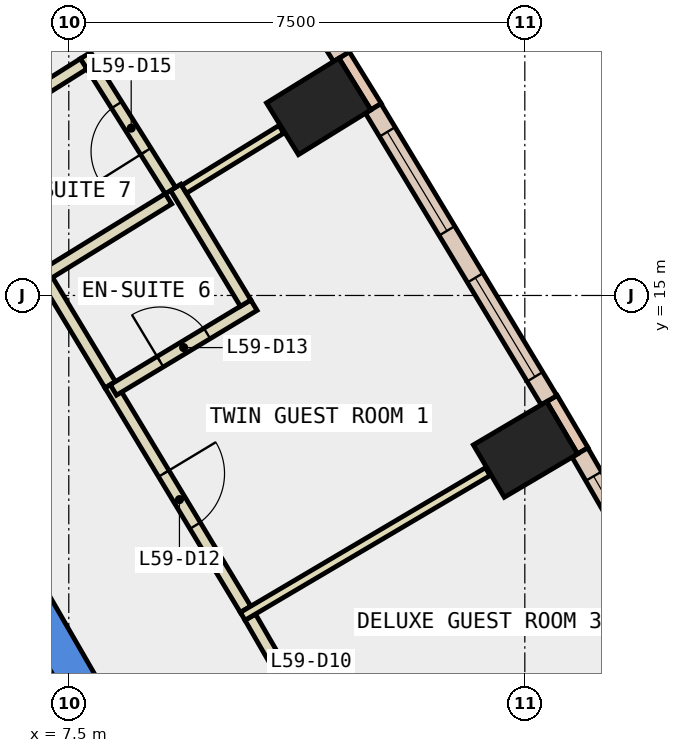
"""IFC4 building model, lengths in metres.
Left out: names, types, materials, properties, quantities, classifications, styles, units other than length and angle.
Written with IfcOpenShell. Run it as: python <this file> out.ifc"""

import sys

from ifc_helpers import new_model, si_unit, direction, frame, frame_2d, origin, origin_2d, place, context, subcontext, project, spatial, polyline, rectangle, outline, extrude, element, fill, save


model = new_model("IFC4")
c1 = context("Model", 3, precision=1e-05, world=origin(), true_north=direction((0.0, 1.0)))
c2 = subcontext(c1, "Body", "Model", "MODEL_VIEW")
j1 = project(units=[si_unit("LENGTHUNIT", "METRE"), si_unit("PLANEANGLEUNIT", "RADIAN")], contexts=[c1])
p1 = place(None, origin())
s1 = spatial("IfcSite", under=j1, at=p1, CompositionType="ELEMENT")
p2 = place(p1, origin())
s2 = spatial("IfcBuilding", under=s1, at=p2, CompositionType="ELEMENT")
p3 = place(p2, frame((0.0, 0.0, 259.4)))
s3 = spatial("IfcBuildingStorey", under=s2, at=p3, CompositionType="ELEMENT", Elevation=259.4)
for number, where, z_axis, x_axis in (
    (1, (15.011, 12.468, -0.34), (0.0, 0.0, 1.0), (-0.509, 0.861, 0.0)),
    (2, (11.61, 18.109, -0.34), (0.0, 0.0, 1.0), (-0.526, 0.851, 0.0)),
):
    element("IfcColumn", number, at=place(p3, frame(where, z_axis=z_axis, x_axis=x_axis)), inside=s3, PredefinedType="COLUMN", context=c2, shape_type="SweptSolid", body=[
        extrude(rectangle(XDim=1.0, YDim=1.4, at=origin_2d()), origin(), (0.0, 0.0, 1.0), 3.6),
    ])
p4 = place(p3, frame((0.0, 0.0, -0.34)))
e3 = element("IfcWall", 3, at=p4, inside=s3, PredefinedType="SHEAR", context=c2, shape_type="SweptSolid", body=[
    extrude(outline(polyline([(6.786, 10.747), (6.266, 10.447), (10.854, 2.5), (11.547, 2.5), (6.786, 10.747)])), origin(), (0.0, 0.0, 1.0), 3.6),
])
p5 = place(p3, frame((15.954, 12.445, 0.0), z_axis=(0.0, 0.0, 1.0), x_axis=(-0.508268432768, 0.861198699634, 0.0)))
e4 = element("IfcWall", 4, at=p5, inside=s3, PredefinedType="STANDARD", context=c2, shape_type="SweptSolid", body=[
    extrude(rectangle(XDim=1.0, YDim=0.2, at=frame_2d((0.5, 0.0))), origin(), (0.0, 0.0, 1.0), 3.26),
])
p6 = place(p3, frame((12.554, 18.104, 0.0), z_axis=(0.0, 0.0, 1.0), x_axis=(-0.525648735675, 0.850701714282, 0.0)))
e5 = element("IfcWall", 5, at=p6, inside=s3, PredefinedType="STANDARD", context=c2, shape_type="SweptSolid", body=[
    extrude(rectangle(XDim=1.0, YDim=0.2, at=frame_2d((0.5, 0.0))), origin(), (0.0, 0.0, 1.0), 3.26),
])
p7 = place(p3, frame((18.708, 7.566, 0.0), z_axis=(0.0, 0.0, 1.0), x_axis=(-0.500089564757, 0.865973687372, 0.0)))
e6 = element("IfcWall", 6, at=p7, inside=s3, PredefinedType="STANDARD", context=c2, shape_type="SweptSolid", body=[
    extrude(rectangle(XDim=5.603, YDim=0.3, at=frame_2d((2.802, 0.0))), origin(), (0.0, 0.0, 1.0), 3.26),
])
p8 = place(p7, frame((0.451, 0.0, 0.9)))
e7 = element("IfcOpeningElement", 7, at=p8, cuts=e6, PredefinedType="OPENING", context=c2, shape_type="SweptSolid", body=[
    extrude(rectangle(XDim=1.9, YDim=2.0, at=frame_2d((0.95, 1.0))), frame((0.0, 0.16, 0.0), z_axis=(0.0, -1.0, 0.0), x_axis=(1.0, 0.0, 0.0)), (0.0, 0.0, 1.0), 0.32),
])
p9 = place(p7, frame((3.252, 0.0, 0.9)))
e8 = element("IfcOpeningElement", 8, at=p9, cuts=e6, PredefinedType="OPENING", context=c2, shape_type="SweptSolid", body=[
    extrude(rectangle(XDim=1.9, YDim=2.0, at=frame_2d((0.95, 1.0))), frame((0.0, 0.16, 0.0), z_axis=(0.0, -1.0, 0.0), x_axis=(1.0, 0.0, 0.0)), (0.0, 0.0, 1.0), 0.32),
])
p10 = place(p3, frame((15.399, 13.277, 0.0), z_axis=(0.0, 0.0, 1.0), x_axis=(-0.516269519619, 0.856426169096, 0.0)))
e9 = element("IfcWall", 9, at=p10, inside=s3, PredefinedType="STANDARD", context=c2, shape_type="SweptSolid", body=[
    extrude(rectangle(XDim=5.603, YDim=0.3, at=frame_2d((2.802, 0.0))), origin(), (0.0, 0.0, 1.0), 3.26),
])
p11 = place(p10, frame((0.451, 0.0, 0.9)))
e10 = element("IfcOpeningElement", 10, at=p11, cuts=e9, PredefinedType="OPENING", context=c2, shape_type="SweptSolid", body=[
    extrude(rectangle(XDim=1.9, YDim=2.0, at=frame_2d((0.95, 1.0))), frame((0.0, 0.16, 0.0), z_axis=(0.0, -1.0, 0.0), x_axis=(1.0, 0.0, 0.0)), (0.0, 0.0, 1.0), 0.32),
])
p12 = place(p10, frame((3.253, 0.0, 0.9)))
e11 = element("IfcOpeningElement", 11, at=p12, cuts=e9, PredefinedType="OPENING", context=c2, shape_type="SweptSolid", body=[
    extrude(rectangle(XDim=1.9, YDim=2.0, at=frame_2d((0.95, 1.0))), frame((0.0, 0.16, 0.0), z_axis=(0.0, -1.0, 0.0), x_axis=(1.0, 0.0, 0.0)), (0.0, 0.0, 1.0), 0.32),
])
p13 = place(p3, frame((11.983, 18.926, 0.0), z_axis=(0.0, 0.0, 1.0), x_axis=(-0.532558226688, 0.846393369059, 0.0)))
e12 = element("IfcWall", 12, at=p13, inside=s3, PredefinedType="STANDARD", context=c2, shape_type="SweptSolid", body=[
    extrude(rectangle(XDim=5.637, YDim=0.3, at=frame_2d((2.818, 0.0))), origin(), (0.0, 0.0, 1.0), 3.26),
])
p14 = place(p13, frame((0.459, 0.0, 0.9)))
e13 = element("IfcOpeningElement", 13, at=p14, cuts=e12, PredefinedType="OPENING", context=c2, shape_type="SweptSolid", body=[
    extrude(rectangle(XDim=1.9, YDim=2.0, at=frame_2d((0.95, 1.0))), frame((0.0, 0.16, 0.0), z_axis=(0.0, -1.0, 0.0), x_axis=(1.0, 0.0, 0.0)), (0.0, 0.0, 1.0), 0.32),
])
p15 = place(p13, frame((3.278, 0.0, 0.9)))
e14 = element("IfcOpeningElement", 14, at=p15, cuts=e12, PredefinedType="OPENING", context=c2, shape_type="SweptSolid", body=[
    extrude(rectangle(XDim=1.9, YDim=2.0, at=frame_2d((0.95, 1.0))), frame((0.0, 0.16, 0.0), z_axis=(0.0, -1.0, 0.0), x_axis=(1.0, 0.0, 0.0)), (0.0, 0.0, 1.0), 0.32),
])
p16 = place(p3, frame((10.484, 9.71, 0.0), z_axis=(0.0, 0.0, 1.0), x_axis=(0.500034145141, -0.866005689181, 0.0)))
e15 = element("IfcWall", 15, at=p16, inside=s3, PredefinedType="PARTITIONING", context=c2, shape_type="SweptSolid", body=[
    extrude(rectangle(XDim=3.91, YDim=0.2, at=frame_2d((1.955, 0.0))), origin(), (0.0, 0.0, 1.0), 3.26),
])
p17 = place(p16, frame((1.505, 0.0, 0.0)))
e16 = element("IfcOpeningElement", 16, at=p17, cuts=e15, PredefinedType="OPENING", context=c2, shape_type="SweptSolid", body=[
    extrude(rectangle(XDim=1.0, YDim=2.1, at=frame_2d((0.5, 1.05))), frame((0.0, 0.11, 0.0), z_axis=(0.0, -1.0, 0.0), x_axis=(1.0, 0.0, 0.0)), (0.0, 0.0, 1.0), 0.22),
])
p18 = place(p3, frame((8.181, 13.532, 0.0), z_axis=(0.0, 0.0, 1.0), x_axis=(0.51625987265, -0.856431984393, 0.0)))
e17 = element("IfcWall", 17, at=p18, inside=s3, PredefinedType="PARTITIONING", context=c2, shape_type="SweptSolid", body=[
    extrude(rectangle(XDim=4.312, YDim=0.2, at=frame_2d((2.156, 0.0))), origin(), (0.0, 0.0, 1.0), 3.26),
])
p19 = place(p18, frame((1.706, 0.0, 0.0)))
e18 = element("IfcOpeningElement", 18, at=p19, cuts=e17, PredefinedType="OPENING", context=c2, shape_type="SweptSolid", body=[
    extrude(rectangle(XDim=1.0, YDim=2.1, at=frame_2d((0.5, 1.05))), frame((0.0, 0.11, 0.0), z_axis=(0.0, -1.0, 0.0), x_axis=(1.0, 0.0, 0.0)), (0.0, 0.0, 1.0), 0.22),
])
p20 = place(p3, frame((7.148, 15.245, 0.0), z_axis=(0.0, 0.0, 1.0), x_axis=(0.516361066184, -0.856370976463, 0.0)))
e19 = element("IfcWall", 19, at=p20, inside=s3, PredefinedType="PARTITIONING", context=c2, shape_type="SweptSolid", body=[
    extrude(rectangle(XDim=2.0, YDim=0.2, at=frame_2d((1.0, 0.0))), origin(), (0.0, 0.0, 1.0), 3.26),
])
p21 = place(p3, frame((5.766, 17.446, 0.0), z_axis=(0.0, 0.0, 1.0), x_axis=(0.532437006176, -0.846469629966, 0.0)))
e20 = element("IfcWall", 20, at=p21, inside=s3, PredefinedType="PARTITIONING", context=c2, shape_type="SweptSolid", body=[
    extrude(rectangle(XDim=2.599, YDim=0.2, at=frame_2d((1.299, 0.0))), origin(), (0.0, 0.0, 1.0), 3.26),
])
p22 = place(p3, frame((10.36, 9.724, 0.0), z_axis=(0.0, 0.0, 1.0), x_axis=(0.861211954005, 0.508245974188, 0.0)))
e21 = element("IfcWall", 21, at=p22, inside=s3, PredefinedType="PARTITIONING", context=c2, shape_type="SweptSolid", body=[
    extrude(rectangle(XDim=4.681, YDim=0.15, at=frame_2d((2.34, 0.0))), origin(), (0.0, 0.0, 1.0), 3.26),
])
p23 = place(p3, frame((8.233, 13.446, 0.0), z_axis=(0.0, 0.0, 1.0), x_axis=(0.856373825811, 0.516356340589, 0.0)))
e22 = element("IfcWall", 22, at=p23, inside=s3, PredefinedType="PARTITIONING", context=c2, shape_type="SweptSolid", body=[
    extrude(rectangle(XDim=2.7, YDim=0.2, at=frame_2d((1.35, 0.0))), origin(), (0.0, 0.0, 1.0), 3.26),
])
p24 = place(p23, frame((0.9, 0.0, 0.0)))
e23 = element("IfcOpeningElement", 23, at=p24, cuts=e22, PredefinedType="OPENING", context=c2, shape_type="SweptSolid", body=[
    extrude(rectangle(XDim=0.9, YDim=2.1, at=frame_2d((0.45, 1.05))), frame((0.0, 0.11, 0.0), z_axis=(0.0, -1.0, 0.0), x_axis=(1.0, 0.0, 0.0)), (0.0, 0.0, 1.0), 0.22),
])
p25 = place(p3, frame((10.408, 14.874, 0.0), z_axis=(0.0, 0.0, 1.0), x_axis=(-0.516768967276, 0.856124894195, 0.0)))
e24 = element("IfcWall", 24, at=p25, inside=s3, PredefinedType="PARTITIONING", context=c2, shape_type="SweptSolid", body=[
    extrude(rectangle(XDim=2.225, YDim=0.2, at=frame_2d((1.113, 0.0))), origin(), (0.0, 0.0, 1.0), 3.26),
])
p26 = place(p3, frame((9.395, 16.746, 0.0), z_axis=(0.0, 0.0, 1.0), x_axis=(0.851524542888, 0.524314745987, 0.0)))
e25 = element("IfcWall", 25, at=p26, inside=s3, PredefinedType="PARTITIONING", context=c2, shape_type="SweptSolid", body=[
    extrude(rectangle(XDim=1.88, YDim=0.15, at=frame_2d((0.94, 0.0))), origin(), (0.0, 0.0, 1.0), 3.26),
])
p27 = place(p3, frame((7.097, 15.33, 0.0), z_axis=(0.0, 0.0, 1.0), x_axis=(0.851207242031, 0.524829716302, 0.0)))
e26 = element("IfcWall", 26, at=p27, inside=s3, PredefinedType="PARTITIONING", context=c2, shape_type="SweptSolid", body=[
    extrude(rectangle(XDim=2.399, YDim=0.2, at=frame_2d((1.199, 0.0))), origin(), (0.0, 0.0, 1.0), 3.26),
])
p28 = place(p3, frame((9.172, 16.725, 0.0), z_axis=(0.0, 0.0, 1.0), x_axis=(-0.532329646536, 0.846537150643, 0.0)))
e27 = element("IfcWall", 27, at=p28, inside=s3, PredefinedType="PARTITIONING", context=c2, shape_type="SweptSolid", body=[
    extrude(rectangle(XDim=2.625, YDim=0.2, at=frame_2d((1.312, 0.0))), origin(), (0.0, 0.0, 1.0), 3.26),
])
p29 = place(p28, frame((0.763, 0.0, 0.0)))
e28 = element("IfcOpeningElement", 28, at=p29, cuts=e27, PredefinedType="OPENING", context=c2, shape_type="SweptSolid", body=[
    extrude(rectangle(XDim=0.9, YDim=2.1, at=frame_2d((0.45, 1.05))), frame((0.0, 0.11, 0.0), z_axis=(0.0, -1.0, 0.0), x_axis=(1.0, 0.0, 0.0)), (0.0, 0.0, 1.0), 0.22),
])
p30 = place(p3, frame((7.744, 18.809, 0.0), z_axis=(0.0, 0.0, 1.0), x_axis=(-0.846360434059, -0.532610566605, 0.0)))
e29 = element("IfcWall", 29, at=p30, inside=s3, PredefinedType="PARTITIONING", context=c2, shape_type="SweptSolid", body=[
    extrude(rectangle(XDim=2.3, YDim=0.2, at=frame_2d((1.15, 0.0))), origin(), (0.0, 0.0, 1.0), 3.26),
])
p31 = place(p3, frame((8.48, 3.412, 0.0), z_axis=(0.0, 0.0, 1.0), x_axis=(-0.499978703459, 0.866037698999, 0.0)))
e30 = element("IfcWall", 30, at=p31, inside=s3, PredefinedType="STANDARD", context=c2, shape_type="SweptSolid", body=[
    extrude(rectangle(XDim=6.9, YDim=0.2, at=frame_2d((3.45, 0.0))), origin(), (0.0, 0.0, 1.0), 3.26),
])
p32 = place(p9, origin())
e31 = element("IfcWindow", 31, at=p32, inside=s3, PartitioningType="SINGLE_PANEL", PredefinedType="WINDOW", context=c2, shape_type="SweptSolid", body=[
    extrude(rectangle(XDim=1.9, YDim=2.0, at=frame_2d((0.95, 1.0))), frame((0.0, 0.03, 0.0), z_axis=(0.0, -1.0, 0.0), x_axis=(1.0, 0.0, 0.0)), (0.0, 0.0, 1.0), 0.06),
])
fill(e8, e31)
p33 = place(p11, origin())
e32 = element("IfcWindow", 32, at=p33, inside=s3, PartitioningType="SINGLE_PANEL", PredefinedType="WINDOW", context=c2, shape_type="SweptSolid", body=[
    extrude(rectangle(XDim=1.9, YDim=2.0, at=frame_2d((0.95, 1.0))), frame((0.0, 0.03, 0.0), z_axis=(0.0, -1.0, 0.0), x_axis=(1.0, 0.0, 0.0)), (0.0, 0.0, 1.0), 0.06),
])
fill(e10, e32)
p34 = place(p12, origin())
e33 = element("IfcWindow", 33, at=p34, inside=s3, PartitioningType="SINGLE_PANEL", PredefinedType="WINDOW", context=c2, shape_type="SweptSolid", body=[
    extrude(rectangle(XDim=1.9, YDim=2.0, at=frame_2d((0.95, 1.0))), frame((0.0, 0.03, 0.0), z_axis=(0.0, -1.0, 0.0), x_axis=(1.0, 0.0, 0.0)), (0.0, 0.0, 1.0), 0.06),
])
fill(e11, e33)
p35 = place(p19, origin())
e34 = element("IfcDoor", 34, at=p35, inside=s3, OperationType="SINGLE_SWING_LEFT", PredefinedType="DOOR", context=c2, shape_type="SweptSolid", body=[
    extrude(rectangle(XDim=1.0, YDim=2.1, at=frame_2d((0.5, 1.05))), frame((0.0, 0.025, 0.0), z_axis=(0.0, -1.0, 0.0), x_axis=(1.0, 0.0, 0.0)), (0.0, 0.0, 1.0), 0.05),
])
fill(e18, e34)
p36 = place(p24, origin())
e35 = element("IfcDoor", 35, at=p36, inside=s3, OperationType="SINGLE_SWING_LEFT", PredefinedType="DOOR", context=c2, shape_type="SweptSolid", body=[
    extrude(rectangle(XDim=0.9, YDim=2.1, at=frame_2d((0.45, 1.05))), frame((0.0, 0.025, 0.0), z_axis=(0.0, -1.0, 0.0), x_axis=(1.0, 0.0, 0.0)), (0.0, 0.0, 1.0), 0.05),
])
fill(e23, e35)
p37 = place(p29, origin())
e36 = element("IfcDoor", 36, at=p37, inside=s3, OperationType="SINGLE_SWING_LEFT", PredefinedType="DOOR", context=c2, shape_type="SweptSolid", body=[
    extrude(rectangle(XDim=0.9, YDim=2.1, at=frame_2d((0.45, 1.05))), frame((0.0, 0.025, 0.0), z_axis=(0.0, -1.0, 0.0), x_axis=(1.0, 0.0, 0.0)), (0.0, 0.0, 1.0), 0.05),
])
fill(e28, e36)
save(model, sys.argv[1])
